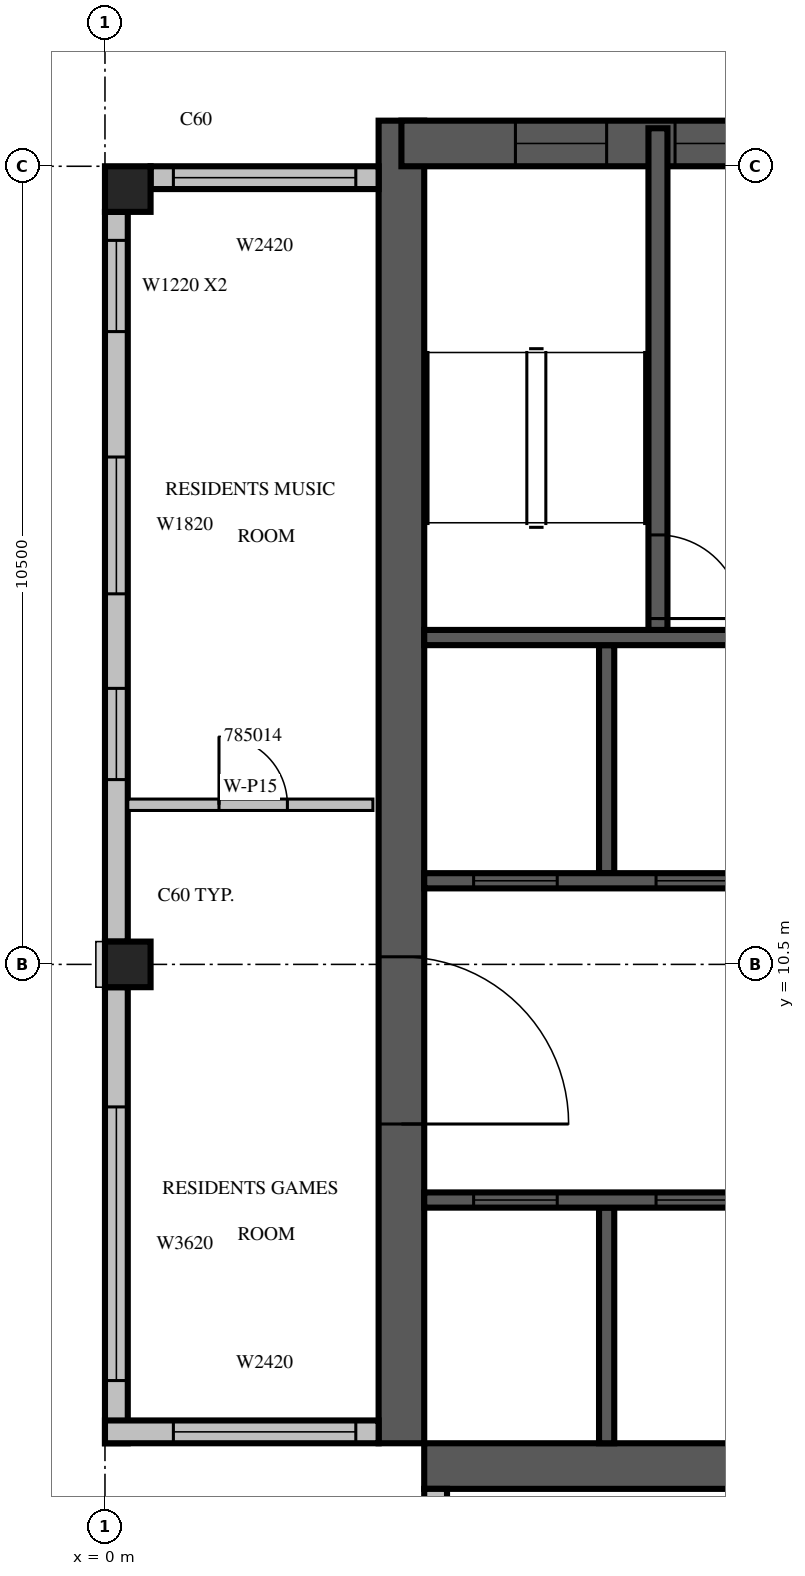
"""IFC4 building model, lengths in metres.
Left out: names, types, materials, properties, quantities, classifications, styles, units other than length and angle.
Written with IfcOpenShell. Run it as: python <this file> out.ifc"""

import sys

from ifc_helpers import new_model, si_unit, direction, frame, frame_2d, origin, origin_2d, place, context, subcontext, project, spatial, rectangle, extrude, source, transform, mapped, element, fill, save


model = new_model("IFC4")
c1 = context("Model", 3, precision=1e-05, world=origin(), true_north=direction((0.0, 1.0)))
c2 = subcontext(c1, "Body", "Model", "MODEL_VIEW")
j1 = project(units=[si_unit("LENGTHUNIT", "METRE"), si_unit("PLANEANGLEUNIT", "RADIAN")], contexts=[c1])
p1 = place(None, origin())
s1 = spatial("IfcSite", under=j1, at=p1, CompositionType="ELEMENT")
p2 = place(p1, origin())
s2 = spatial("IfcBuilding", under=s1, at=p2, CompositionType="ELEMENT")
p3 = place(p2, frame((0.0, 0.0, 358.0)))
s3 = spatial("IfcBuildingStorey", under=s2, at=p3, CompositionType="ELEMENT", Elevation=358.0)
m1 = source(origin(), c2, "Body", "SweptSolid", [
    extrude(rectangle(XDim=0.6, YDim=0.6, at=origin_2d()), origin(), (0.0, 0.0, 1.0), 3.5),
])
for number, where, z_axis, x_axis in (
    (1, (0.3, 10.5, 0.0), (0.0, 0.0, 1.0), (1.0, 0.0, 0.0)),
    (2, (0.3, 20.7, 0.0), (0.0, 0.0, 1.0), (1.0, 0.0, 0.0)),
):
    element("IfcColumn", number, at=place(p3, frame(where, z_axis=z_axis, x_axis=x_axis)), inside=s3, PredefinedType="COLUMN", context=c2, shape_type="MappedRepresentation", body=[
        mapped(m1, transform((0.0, 0.0, 0.0), scale=1.0)),
    ])
m2 = source(origin(), c2, "Body", "SweptSolid", [
    extrude(rectangle(XDim=17.4, YDim=0.6, at=frame_2d((8.7, 0.0))), origin(), (0.0, 0.0, 1.0), 3.5),
])
p4 = place(p3, frame((3.9, 4.2, 0.0), z_axis=(0.0, 0.0, 1.0), x_axis=(0.0, 1.0, 0.0)))
e3 = element("IfcWall", 3, at=p4, inside=s3, PredefinedType="SHEAR", context=c2, shape_type="MappedRepresentation", body=[
    mapped(m2, transform((0.0, 0.0, 0.0), scale=1.0)),
])
m3 = source(origin(), c2, "Body", "SweptSolid", [
    extrude(rectangle(XDim=2.2, YDim=2.1, at=frame_2d((1.1, 1.05))), frame((0.0, 0.31, 0.0), z_axis=(0.0, -1.0, 0.0), x_axis=(1.0, 0.0, 0.0)), (0.0, 0.0, 1.0), 0.62),
])
p5 = place(p4, frame((4.2, 0.0, 0.0)))
e4 = element("IfcOpeningElement", 4, at=p5, cuts=e3, PredefinedType="OPENING", context=c2, shape_type="MappedRepresentation", body=[
    mapped(m3, transform((0.0, 0.0, 0.0), scale=1.0)),
])
p6 = place(p3, frame((4.2, 3.9, 0.0), z_axis=(0.0, 0.0, 1.0), x_axis=(1.0, 0.0, 0.0)))
e5 = element("IfcWall", 5, at=p6, inside=s3, PredefinedType="SHEAR", context=c2, shape_type="MappedRepresentation", body=[
    mapped(m2, transform((0.0, 0.0, 0.0), scale=1.0)),
])
m4 = source(origin(), c2, "Body", "SweptSolid", [
    extrude(rectangle(XDim=0.9, YDim=2.1, at=frame_2d((0.45, 1.05))), frame((0.0, 0.31, 0.0), z_axis=(0.0, -1.0, 0.0), x_axis=(1.0, 0.0, 0.0)), (0.0, 0.0, 1.0), 0.62),
])
p7 = place(p6, frame((14.0, 0.0, 0.0)))
e6 = element("IfcOpeningElement", 6, at=p7, cuts=e5, PredefinedType="OPENING", context=c2, shape_type="MappedRepresentation", body=[
    mapped(m4, transform((0.0, 0.0, 0.0), scale=1.0)),
])
m5 = source(origin(), c2, "Body", "SweptSolid", [
    extrude(rectangle(XDim=6.6, YDim=0.6, at=frame_2d((3.3, 0.0))), origin(), (0.0, 0.0, 1.0), 3.5),
])
p8 = place(p3, frame((3.9, 21.3, 0.0), z_axis=(0.0, 0.0, 1.0), x_axis=(1.0, 0.0, 0.0)))
e7 = element("IfcWall", 7, at=p8, inside=s3, PredefinedType="SHEAR", context=c2, shape_type="MappedRepresentation", body=[
    mapped(m5, transform((0.0, 0.0, 0.0), scale=1.0)),
])
m6 = source(origin(), c2, "Body", "SweptSolid", [
    extrude(rectangle(XDim=1.2, YDim=2.4, at=frame_2d((0.6, 1.2))), frame((0.0, 0.31, 0.0), z_axis=(0.0, -1.0, 0.0), x_axis=(1.0, 0.0, 0.0)), (0.0, 0.0, 1.0), 0.62),
])
p9 = place(p8, frame((1.5, 0.0, 0.6)))
e8 = element("IfcOpeningElement", 8, at=p9, cuts=e7, PredefinedType="OPENING", context=c2, shape_type="MappedRepresentation", body=[
    mapped(m6, transform((0.0, 0.0, 0.0), scale=1.0)),
])
p10 = place(p8, frame((3.6, 0.0, 0.6)))
e9 = element("IfcOpeningElement", 9, at=p10, cuts=e7, PredefinedType="OPENING", context=c2, shape_type="MappedRepresentation", body=[
    mapped(m6, transform((0.0, 0.0, 0.0), scale=1.0)),
])
m7 = source(origin(), c2, "Body", "SweptSolid", [
    extrude(rectangle(XDim=3.0, YDim=0.3, at=frame_2d((1.5, 0.0))), origin(), (0.0, 0.0, 1.0), 3.1),
])
p11 = place(p3, frame((3.6, 20.85, 0.0), z_axis=(0.0, 0.0, 1.0), x_axis=(-1.0, 0.0, 0.0)))
e10 = element("IfcWall", 10, at=p11, inside=s3, PredefinedType="STANDARD", context=c2, shape_type="MappedRepresentation", body=[
    mapped(m7, transform((0.0, 0.0, 0.0), scale=1.0)),
])
m8 = source(origin(), c2, "Body", "SweptSolid", [
    extrude(rectangle(XDim=2.4, YDim=2.0, at=frame_2d((1.2, 1.0))), frame((0.0, 0.16, 0.0), z_axis=(0.0, -1.0, 0.0), x_axis=(1.0, 0.0, 0.0)), (0.0, 0.0, 1.0), 0.32),
])
p12 = place(p11, frame((0.3, 0.0, 0.6)))
e11 = element("IfcOpeningElement", 11, at=p12, cuts=e10, PredefinedType="OPENING", context=c2, shape_type="MappedRepresentation", body=[
    mapped(m8, transform((0.0, 0.0, 0.0), scale=1.0)),
])
m9 = source(origin(), c2, "Body", "SweptSolid", [
    extrude(rectangle(XDim=9.6, YDim=0.3, at=frame_2d((4.8, 0.0))), origin(), (0.0, 0.0, 1.0), 3.1),
])
p13 = place(p3, frame((0.15, 20.4, 0.0), z_axis=(0.0, 0.0, 1.0), x_axis=(0.0, -1.0, 0.0)))
e12 = element("IfcWall", 12, at=p13, inside=s3, PredefinedType="STANDARD", context=c2, shape_type="MappedRepresentation", body=[
    mapped(m9, transform((0.0, 0.0, 0.0), scale=1.0)),
])
m10 = source(origin(), c2, "Body", "SweptSolid", [
    extrude(rectangle(XDim=1.2, YDim=2.0, at=frame_2d((0.6, 1.0))), frame((0.0, 0.16, 0.0), z_axis=(0.0, -1.0, 0.0), x_axis=(1.0, 0.0, 0.0)), (0.0, 0.0, 1.0), 0.32),
])
p14 = place(p13, frame((0.375, 0.0, 0.6)))
e13 = element("IfcOpeningElement", 13, at=p14, cuts=e12, PredefinedType="OPENING", context=c2, shape_type="MappedRepresentation", body=[
    mapped(m10, transform((0.0, 0.0, 0.0), scale=1.0)),
])
m11 = source(origin(), c2, "Body", "SweptSolid", [
    extrude(rectangle(XDim=1.8, YDim=2.0, at=frame_2d((0.9, 1.0))), frame((0.0, 0.16, 0.0), z_axis=(0.0, -1.0, 0.0), x_axis=(1.0, 0.0, 0.0)), (0.0, 0.0, 1.0), 0.32),
])
p15 = place(p13, frame((3.225, 0.0, 0.6)))
e14 = element("IfcOpeningElement", 14, at=p15, cuts=e12, PredefinedType="OPENING", context=c2, shape_type="MappedRepresentation", body=[
    mapped(m11, transform((0.0, 0.0, 0.0), scale=1.0)),
])
p16 = place(p13, frame((6.269, 0.0, 0.6)))
e15 = element("IfcOpeningElement", 15, at=p16, cuts=e12, PredefinedType="OPENING", context=c2, shape_type="MappedRepresentation", body=[
    mapped(m10, transform((0.0, 0.0, 0.0), scale=1.0)),
])
m12 = source(origin(), c2, "Body", "SweptSolid", [
    extrude(rectangle(XDim=6.0, YDim=0.3, at=frame_2d((3.0, 0.0))), origin(), (0.0, 0.0, 1.0), 3.1),
])
p17 = place(p3, frame((0.15, 10.2, 0.0), z_axis=(0.0, 0.0, 1.0), x_axis=(0.0, -1.0, 0.0)))
e16 = element("IfcWall", 16, at=p17, inside=s3, PredefinedType="STANDARD", context=c2, shape_type="MappedRepresentation", body=[
    mapped(m12, transform((0.0, 0.0, 0.0), scale=1.0)),
])
m13 = source(origin(), c2, "Body", "SweptSolid", [
    extrude(rectangle(XDim=3.6, YDim=2.0, at=frame_2d((1.8, 1.0))), frame((0.0, 0.16, 0.0), z_axis=(0.0, -1.0, 0.0), x_axis=(1.0, 0.0, 0.0)), (0.0, 0.0, 1.0), 0.32),
])
p18 = place(p17, frame((1.575, 0.0, 0.6)))
e17 = element("IfcOpeningElement", 17, at=p18, cuts=e16, PredefinedType="OPENING", context=c2, shape_type="MappedRepresentation", body=[
    mapped(m13, transform((0.0, 0.0, 0.0), scale=1.0)),
])
m14 = source(origin(), c2, "Body", "SweptSolid", [
    extrude(rectangle(XDim=3.6, YDim=0.3, at=frame_2d((1.8, 0.0))), origin(), (0.0, 0.0, 1.0), 3.1),
])
p19 = place(p3, frame((0.0, 4.35, 0.0), z_axis=(0.0, 0.0, 1.0), x_axis=(1.0, 0.0, 0.0)))
e18 = element("IfcWall", 18, at=p19, inside=s3, PredefinedType="STANDARD", context=c2, shape_type="MappedRepresentation", body=[
    mapped(m14, transform((0.0, 0.0, 0.0), scale=1.0)),
])
p20 = place(p19, frame((0.9, 0.0, 0.6)))
e19 = element("IfcOpeningElement", 19, at=p20, cuts=e18, PredefinedType="OPENING", context=c2, shape_type="MappedRepresentation", body=[
    mapped(m8, transform((0.0, 0.0, 0.0), scale=1.0)),
])
p21 = place(p3, frame((4.35, 3.6, 0.0), z_axis=(0.0, 0.0, 1.0), x_axis=(0.0, -1.0, 0.0)))
e20 = element("IfcWall", 20, at=p21, inside=s3, PredefinedType="STANDARD", context=c2, shape_type="MappedRepresentation", body=[
    mapped(m14, transform((0.0, 0.0, 0.0), scale=1.0)),
])
p22 = place(p21, frame((0.3, 0.0, 0.6)))
e21 = element("IfcOpeningElement", 21, at=p22, cuts=e20, PredefinedType="OPENING", context=c2, shape_type="MappedRepresentation", body=[
    mapped(m8, transform((0.0, 0.0, 0.0), scale=1.0)),
])
m15 = source(origin(), c2, "Body", "SweptSolid", [
    extrude(rectangle(XDim=3.1, YDim=0.2, at=frame_2d((1.55, 0.0))), origin(), (0.0, 0.0, 1.0), 3.5),
])
p23 = place(p3, frame((6.6, 4.2, 0.0), z_axis=(0.0, 0.0, 1.0), x_axis=(0.0, 1.0, 0.0)))
e22 = element("IfcWall", 22, at=p23, inside=s3, PredefinedType="SOLIDWALL", context=c2, shape_type="MappedRepresentation", body=[
    mapped(m15, transform((0.0, 0.0, 0.0), scale=1.0)),
])
m16 = source(origin(), c2, "Body", "SweptSolid", [
    extrude(rectangle(XDim=3.0, YDim=0.2, at=frame_2d((1.5, 0.0))), origin(), (0.0, 0.0, 1.0), 3.5),
])
p24 = place(p3, frame((6.6, 11.7, 0.0), z_axis=(0.0, 0.0, 1.0), x_axis=(0.0, 1.0, 0.0)))
e23 = element("IfcWall", 23, at=p24, inside=s3, PredefinedType="SOLIDWALL", context=c2, shape_type="MappedRepresentation", body=[
    mapped(m16, transform((0.0, 0.0, 0.0), scale=1.0)),
])
m17 = source(origin(), c2, "Body", "SweptSolid", [
    extrude(rectangle(XDim=9.6, YDim=0.2, at=frame_2d((4.8, 0.0))), origin(), (0.0, 0.0, 1.0), 3.5),
])
p25 = place(p3, frame((4.2, 7.4, 0.0), z_axis=(0.0, 0.0, 1.0), x_axis=(1.0, 0.0, 0.0)))
e24 = element("IfcWall", 24, at=p25, inside=s3, PredefinedType="SOLIDWALL", context=c2, shape_type="MappedRepresentation", body=[
    mapped(m17, transform((0.0, 0.0, 0.0), scale=1.0)),
])
m18 = source(origin(), c2, "Body", "SweptSolid", [
    extrude(rectangle(XDim=1.1, YDim=2.1, at=frame_2d((0.55, 1.05))), frame((0.0, 0.11, 0.0), z_axis=(0.0, -1.0, 0.0), x_axis=(1.0, 0.0, 0.0)), (0.0, 0.0, 1.0), 0.22),
])
p26 = place(p25, frame((0.65, 0.0, 0.0)))
e25 = element("IfcOpeningElement", 25, at=p26, cuts=e24, PredefinedType="OPENING", context=c2, shape_type="MappedRepresentation", body=[
    mapped(m18, transform((0.0, 0.0, 0.0), scale=1.0)),
])
p27 = place(p25, frame((3.05, 0.0, 0.0)))
e26 = element("IfcOpeningElement", 26, at=p27, cuts=e24, PredefinedType="OPENING", context=c2, shape_type="MappedRepresentation", body=[
    mapped(m18, transform((0.0, 0.0, 0.0), scale=1.0)),
])
p28 = place(p25, frame((5.45, 0.0, 0.0)))
e27 = element("IfcOpeningElement", 27, at=p28, cuts=e24, PredefinedType="OPENING", context=c2, shape_type="MappedRepresentation", body=[
    mapped(m18, transform((0.0, 0.0, 0.0), scale=1.0)),
])
p29 = place(p25, frame((7.85, 0.0, 0.0)))
e28 = element("IfcOpeningElement", 28, at=p29, cuts=e24, PredefinedType="OPENING", context=c2, shape_type="MappedRepresentation", body=[
    mapped(m18, transform((0.0, 0.0, 0.0), scale=1.0)),
])
m19 = source(origin(), c2, "Body", "SweptSolid", [
    extrude(rectangle(XDim=4.8, YDim=0.2, at=frame_2d((2.4, 0.0))), origin(), (0.0, 0.0, 1.0), 3.5),
])
p30 = place(p3, frame((4.2, 11.6, 0.0), z_axis=(0.0, 0.0, 1.0), x_axis=(1.0, 0.0, 0.0)))
e29 = element("IfcWall", 29, at=p30, inside=s3, PredefinedType="SOLIDWALL", context=c2, shape_type="MappedRepresentation", body=[
    mapped(m19, transform((0.0, 0.0, 0.0), scale=1.0)),
])
p31 = place(p30, frame((0.65, 0.0, 0.0)))
e30 = element("IfcOpeningElement", 30, at=p31, cuts=e29, PredefinedType="OPENING", context=c2, shape_type="MappedRepresentation", body=[
    mapped(m18, transform((0.0, 0.0, 0.0), scale=1.0)),
])
p32 = place(p30, frame((3.05, 0.0, 0.0)))
e31 = element("IfcOpeningElement", 31, at=p32, cuts=e29, PredefinedType="OPENING", context=c2, shape_type="MappedRepresentation", body=[
    mapped(m18, transform((0.0, 0.0, 0.0), scale=1.0)),
])
p33 = place(p3, frame((4.2, 14.8, 0.0), z_axis=(0.0, 0.0, 1.0), x_axis=(1.0, 0.0, 0.0)))
e32 = element("IfcWall", 32, at=p33, inside=s3, PredefinedType="SOLIDWALL", context=c2, shape_type="MappedRepresentation", body=[
    mapped(m19, transform((0.0, 0.0, 0.0), scale=1.0)),
])
m20 = source(origin(), c2, "Body", "SweptSolid", [
    extrude(rectangle(XDim=6.6, YDim=0.25, at=frame_2d((3.3, 0.0))), origin(), (0.0, 0.0, 1.0), 3.1),
])
p34 = place(p3, frame((7.275, 14.9, 0.0), z_axis=(0.0, 0.0, 1.0), x_axis=(0.0, 1.0, 0.0)))
e33 = element("IfcWall", 33, at=p34, inside=s3, PredefinedType="SOLIDWALL", context=c2, shape_type="MappedRepresentation", body=[
    mapped(m20, transform((0.0, 0.0, 0.0), scale=1.0)),
])
m21 = source(origin(), c2, "Body", "SweptSolid", [
    extrude(rectangle(XDim=1.1, YDim=2.1, at=frame_2d((0.55, 1.05))), frame((0.0, 0.135, 0.0), z_axis=(0.0, -1.0, 0.0), x_axis=(1.0, 0.0, 0.0)), (0.0, 0.0, 1.0), 0.27),
])
p35 = place(p34, frame((0.15, 0.0, 0.0)))
e34 = element("IfcOpeningElement", 34, at=p35, cuts=e33, PredefinedType="OPENING", context=c2, shape_type="MappedRepresentation", body=[
    mapped(m21, transform((0.0, 0.0, 0.0), scale=1.0)),
])
m22 = source(origin(), c2, "Body", "SweptSolid", [
    extrude(rectangle(XDim=3.225, YDim=0.15, at=frame_2d((1.613, 0.0))), origin(), (0.0, 0.0, 1.0), 3.1),
])
p36 = place(p3, frame((0.3, 12.6, 0.0), z_axis=(0.0, 0.0, 1.0), x_axis=(1.0, 0.0, 0.0)))
e35 = element("IfcWall", 35, at=p36, inside=s3, PredefinedType="PARTITIONING", context=c2, shape_type="MappedRepresentation", body=[
    mapped(m22, transform((0.0, 0.0, 0.0), scale=1.0)),
])
m23 = source(origin(), c2, "Body", "SweptSolid", [
    extrude(rectangle(XDim=0.9, YDim=2.1, at=frame_2d((0.45, 1.05))), frame((0.0, 0.085, 0.0), z_axis=(0.0, -1.0, 0.0), x_axis=(1.0, 0.0, 0.0)), (0.0, 0.0, 1.0), 0.17),
])
p37 = place(p36, frame((1.2, 0.0, 0.0)))
e36 = element("IfcOpeningElement", 36, at=p37, cuts=e35, PredefinedType="OPENING", context=c2, shape_type="MappedRepresentation", body=[
    mapped(m23, transform((0.0, 0.0, 0.0), scale=1.0)),
])
m24 = source(origin(), c2, "Body", "SweptSolid", [
    extrude(rectangle(XDim=2.4, YDim=2.0, at=frame_2d((1.2, 1.0))), frame((0.0, 0.03, 0.0), z_axis=(0.0, -1.0, 0.0), x_axis=(1.0, 0.0, 0.0)), (0.0, 0.0, 1.0), 0.06),
])
p38 = place(p12, origin())
e37 = element("IfcWindow", 37, at=p38, inside=s3, PartitioningType="SINGLE_PANEL", PredefinedType="WINDOW", context=c2, shape_type="MappedRepresentation", body=[
    mapped(m24, transform((0.0, 0.0, 0.0), scale=1.0)),
])
fill(e11, e37)
m25 = source(origin(), c2, "Body", "SweptSolid", [
    extrude(rectangle(XDim=1.2, YDim=2.0, at=frame_2d((0.6, 1.0))), frame((0.0, 0.03, 0.0), z_axis=(0.0, -1.0, 0.0), x_axis=(1.0, 0.0, 0.0)), (0.0, 0.0, 1.0), 0.06),
])
p39 = place(p14, origin())
e38 = element("IfcWindow", 38, at=p39, inside=s3, PartitioningType="SINGLE_PANEL", PredefinedType="WINDOW", context=c2, shape_type="MappedRepresentation", body=[
    mapped(m25, transform((0.0, 0.0, 0.0), scale=1.0)),
])
fill(e13, e38)
m26 = source(origin(), c2, "Body", "SweptSolid", [
    extrude(rectangle(XDim=1.8, YDim=2.0, at=frame_2d((0.9, 1.0))), frame((0.0, 0.03, 0.0), z_axis=(0.0, -1.0, 0.0), x_axis=(1.0, 0.0, 0.0)), (0.0, 0.0, 1.0), 0.06),
])
p40 = place(p15, origin())
e39 = element("IfcWindow", 39, at=p40, inside=s3, PartitioningType="SINGLE_PANEL", PredefinedType="WINDOW", context=c2, shape_type="MappedRepresentation", body=[
    mapped(m26, transform((0.0, 0.0, 0.0), scale=1.0)),
])
fill(e14, e39)
m27 = source(origin(), c2, "Body", "SweptSolid", [
    extrude(rectangle(XDim=3.6, YDim=2.0, at=frame_2d((1.8, 1.0))), frame((0.0, 0.03, 0.0), z_axis=(0.0, -1.0, 0.0), x_axis=(1.0, 0.0, 0.0)), (0.0, 0.0, 1.0), 0.06),
])
p41 = place(p18, origin())
e40 = element("IfcWindow", 40, at=p41, inside=s3, PartitioningType="SINGLE_PANEL", PredefinedType="WINDOW", context=c2, shape_type="MappedRepresentation", body=[
    mapped(m27, transform((0.0, 0.0, 0.0), scale=1.0)),
])
fill(e17, e40)
p42 = place(p16, origin())
e41 = element("IfcWindow", 41, at=p42, inside=s3, PartitioningType="SINGLE_PANEL", PredefinedType="WINDOW", context=c2, shape_type="MappedRepresentation", body=[
    mapped(m25, transform((0.0, 0.0, 0.0), scale=1.0)),
])
fill(e15, e41)
p43 = place(p20, origin())
e42 = element("IfcWindow", 42, at=p43, inside=s3, PartitioningType="SINGLE_PANEL", PredefinedType="WINDOW", context=c2, shape_type="MappedRepresentation", body=[
    mapped(m24, transform((0.0, 0.0, 0.0), scale=1.0)),
])
fill(e19, e42)
m28 = source(origin(), c2, "Body", "SweptSolid", [
    extrude(rectangle(XDim=1.1, YDim=2.1, at=frame_2d((0.55, 1.05))), frame((0.0, 0.025, 0.0), z_axis=(0.0, -1.0, 0.0), x_axis=(1.0, 0.0, 0.0)), (0.0, 0.0, 1.0), 0.05),
])
p44 = place(p26, origin())
e43 = element("IfcDoor", 43, at=p44, inside=s3, OperationType="SLIDING_TO_LEFT", PredefinedType="DOOR", context=c2, shape_type="MappedRepresentation", body=[
    mapped(m28, transform((0.0, 0.0, 0.0), scale=1.0)),
])
fill(e25, e43)
p45 = place(p27, origin())
e44 = element("IfcDoor", 44, at=p45, inside=s3, OperationType="SLIDING_TO_LEFT", PredefinedType="DOOR", context=c2, shape_type="MappedRepresentation", body=[
    mapped(m28, transform((0.0, 0.0, 0.0), scale=1.0)),
])
fill(e26, e44)
p46 = place(p31, origin())
e45 = element("IfcDoor", 45, at=p46, inside=s3, OperationType="SLIDING_TO_LEFT", PredefinedType="DOOR", context=c2, shape_type="MappedRepresentation", body=[
    mapped(m28, transform((0.0, 0.0, 0.0), scale=1.0)),
])
fill(e30, e45)
p47 = place(p32, origin())
e46 = element("IfcDoor", 46, at=p47, inside=s3, OperationType="SLIDING_TO_LEFT", PredefinedType="DOOR", context=c2, shape_type="MappedRepresentation", body=[
    mapped(m28, transform((0.0, 0.0, 0.0), scale=1.0)),
])
fill(e31, e46)
p48 = place(p35, origin())
e47 = element("IfcDoor", 47, at=p48, inside=s3, OperationType="SINGLE_SWING_RIGHT", PredefinedType="DOOR", context=c2, shape_type="MappedRepresentation", body=[
    mapped(m28, transform((0.0, 0.0, 0.0), scale=1.0)),
])
fill(e34, e47)
m29 = source(origin(), c2, "Body", "SweptSolid", [
    extrude(rectangle(XDim=2.2, YDim=2.1, at=frame_2d((1.1, 1.05))), frame((0.0, 0.025, 0.0), z_axis=(0.0, -1.0, 0.0), x_axis=(1.0, 0.0, 0.0)), (0.0, 0.0, 1.0), 0.05),
])
p49 = place(p5, origin())
e48 = element("IfcDoor", 48, at=p49, inside=s3, OperationType="DOUBLE_DOOR_SINGLE_SWING", PredefinedType="DOOR", context=c2, shape_type="MappedRepresentation", body=[
    mapped(m29, transform((0.0, 0.0, 0.0), scale=1.0)),
])
fill(e4, e48)
m30 = source(origin(), c2, "Body", "SweptSolid", [
    extrude(rectangle(XDim=1.2, YDim=2.4, at=frame_2d((0.6, 1.2))), frame((0.0, 0.03, 0.0), z_axis=(0.0, -1.0, 0.0), x_axis=(1.0, 0.0, 0.0)), (0.0, 0.0, 1.0), 0.06),
])
p50 = place(p9, origin())
e49 = element("IfcWindow", 49, at=p50, inside=s3, PartitioningType="SINGLE_PANEL", PredefinedType="WINDOW", context=c2, shape_type="MappedRepresentation", body=[
    mapped(m30, transform((0.0, 0.0, 0.0), scale=1.0)),
])
fill(e8, e49)
p51 = place(p10, origin())
e50 = element("IfcWindow", 50, at=p51, inside=s3, PartitioningType="SINGLE_PANEL", PredefinedType="WINDOW", context=c2, shape_type="MappedRepresentation", body=[
    mapped(m30, transform((0.0, 0.0, 0.0), scale=1.0)),
])
fill(e9, e50)
m31 = source(origin(), c2, "Body", "SweptSolid", [
    extrude(rectangle(XDim=0.9, YDim=2.1, at=frame_2d((0.45, 1.05))), frame((0.0, 0.025, 0.0), z_axis=(0.0, -1.0, 0.0), x_axis=(1.0, 0.0, 0.0)), (0.0, 0.0, 1.0), 0.05),
])
p52 = place(p37, origin())
e51 = element("IfcDoor", 51, at=p52, inside=s3, OperationType="SINGLE_SWING_LEFT", PredefinedType="DOOR", context=c2, shape_type="MappedRepresentation", body=[
    mapped(m31, transform((0.0, 0.0, 0.0), scale=1.0)),
])
fill(e36, e51)
save(model, sys.argv[1])
